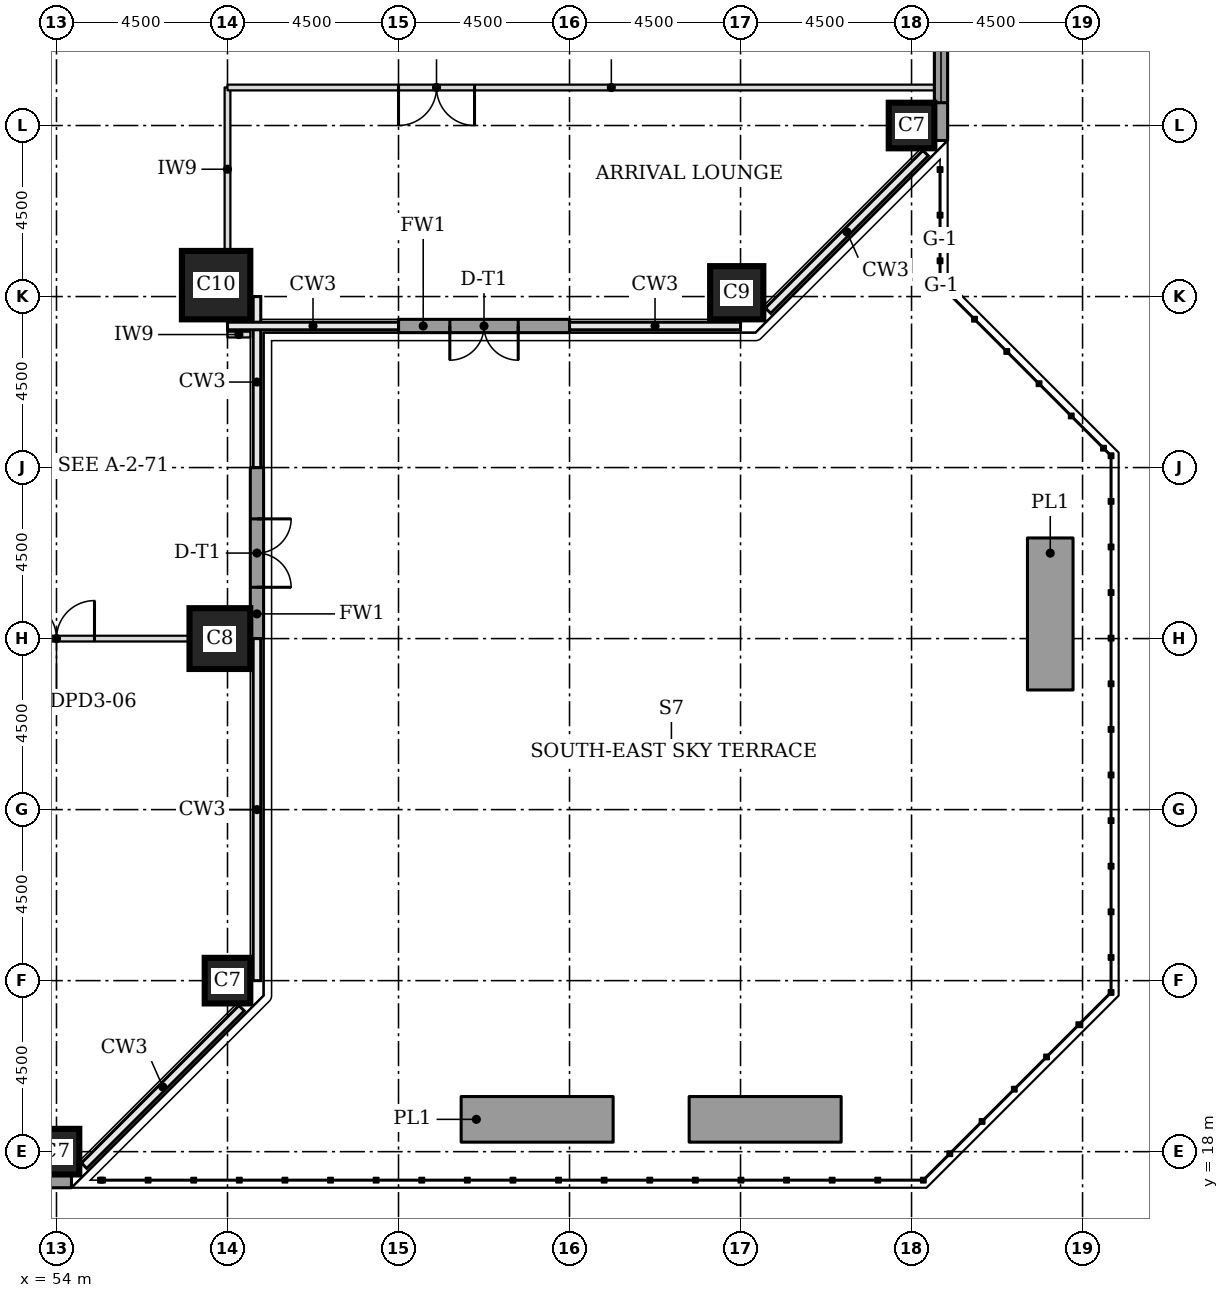
"""IFC4 building model, lengths in metres.
Left out: names, types, materials, properties, quantities, classifications, styles, units other than length and angle.
Written with IfcOpenShell. Run it as: python <this file> out.ifc"""

import sys

from ifc_helpers import new_model, si_unit, direction, frame, frame_2d, origin, origin_2d, place, context, subcontext, project, spatial, rectangle, extrude, element, fill, save


model = new_model("IFC4")
c1 = context("Model", 3, precision=1e-05, world=origin(), true_north=direction((0.0, 1.0)))
c2 = subcontext(c1, "Body", "Model", "MODEL_VIEW")
j1 = project(units=[si_unit("LENGTHUNIT", "METRE"), si_unit("PLANEANGLEUNIT", "RADIAN")], contexts=[c1])
p1 = place(None, origin())
s1 = spatial("IfcSite", under=j1, at=p1, CompositionType="ELEMENT")
p2 = place(p1, origin())
s2 = spatial("IfcBuilding", under=s1, at=p2, CompositionType="ELEMENT")
p3 = place(p2, frame((0.0, 0.0, 18.5)))
s3 = spatial("IfcBuildingStorey", under=s2, at=p3, CompositionType="ELEMENT", Elevation=18.5)
for number, where, z_axis, x_axis in (
    (1, (54.0, 18.0, 0.0), (0.0, 0.0, 1.0), (1.0, 0.0, 0.0)),
    (2, (58.5, 22.5, 0.0), (0.0, 0.0, 1.0), (1.0, 0.0, 0.0)),
):
    element("IfcColumn", number, at=place(p3, frame(where, z_axis=z_axis, x_axis=x_axis)), inside=s3, PredefinedType="COLUMN", context=c2, shape_type="SweptSolid", body=[
        extrude(rectangle(XDim=1.2, YDim=1.2, at=origin_2d()), origin(), (0.0, 0.0, 1.0), 4.6),
    ])
p4 = place(p3, frame((58.3, 31.5, 0.0), z_axis=(0.0, 0.0, 1.0), x_axis=(1.0, 0.0, 0.0)))
e3 = element("IfcColumn", 3, at=p4, inside=s3, PredefinedType="COLUMN", context=c2, shape_type="SweptSolid", body=[
    extrude(rectangle(XDim=1.6, YDim=1.6, at=origin_2d()), origin(), (0.0, 0.0, 1.0), 4.6),
])
p5 = place(p3, frame((58.2, 40.8, 0.0), z_axis=(0.0, 0.0, 1.0), x_axis=(1.0, 0.0, 0.0)))
e4 = element("IfcColumn", 4, at=p5, inside=s3, PredefinedType="COLUMN", context=c2, shape_type="SweptSolid", body=[
    extrude(rectangle(XDim=1.8, YDim=1.8, at=origin_2d()), origin(), (0.0, 0.0, 1.0), 4.6),
])
p6 = place(p3, frame((71.9, 40.6, 0.0), z_axis=(0.0, 0.0, 1.0), x_axis=(1.0, 0.0, 0.0)))
e5 = element("IfcColumn", 5, at=p6, inside=s3, PredefinedType="COLUMN", context=c2, shape_type="SweptSolid", body=[
    extrude(rectangle(XDim=1.4, YDim=1.4, at=origin_2d()), origin(), (0.0, 0.0, 1.0), 4.6),
])
p7 = place(p3, frame((76.5, 45.0, 0.0), z_axis=(0.0, 0.0, 1.0), x_axis=(1.0, 0.0, 0.0)))
e6 = element("IfcColumn", 6, at=p7, inside=s3, PredefinedType="COLUMN", context=c2, shape_type="SweptSolid", body=[
    extrude(rectangle(XDim=1.2, YDim=1.2, at=origin_2d()), origin(), (0.0, 0.0, 1.0), 4.6),
])
p8 = place(p3, frame((36.0, 17.225, 0.0), z_axis=(0.0, 0.0, 1.0), x_axis=(1.0, 0.0, 0.0)))
e7 = element("IfcWall", 7, at=p8, inside=s3, PredefinedType="STANDARD", context=c2, shape_type="SweptSolid", body=[
    extrude(rectangle(XDim=18.394, YDim=0.35, at=frame_2d((9.197, 0.0))), origin(), (0.0, 0.0, 1.0), 4.355),
])
p9 = place(p8, frame((0.6, 0.0, 0.9)))
e8 = element("IfcOpeningElement", 8, at=p9, cuts=e7, PredefinedType="OPENING", context=c2, shape_type="SweptSolid", body=[
    extrude(rectangle(XDim=3.3, YDim=2.7, at=frame_2d((1.65, 1.35))), frame((0.0, 0.185, 0.0), z_axis=(0.0, -1.0, 0.0), x_axis=(1.0, 0.0, 0.0)), (0.0, 0.0, 1.0), 0.37),
])
p10 = place(p8, frame((5.1, 0.0, 0.9)))
e9 = element("IfcOpeningElement", 9, at=p10, cuts=e7, PredefinedType="OPENING", context=c2, shape_type="SweptSolid", body=[
    extrude(rectangle(XDim=3.3, YDim=2.7, at=frame_2d((1.65, 1.35))), frame((0.0, 0.185, 0.0), z_axis=(0.0, -1.0, 0.0), x_axis=(1.0, 0.0, 0.0)), (0.0, 0.0, 1.0), 0.37),
])
p11 = place(p8, frame((9.6, 0.0, 0.9)))
e10 = element("IfcOpeningElement", 10, at=p11, cuts=e7, PredefinedType="OPENING", context=c2, shape_type="SweptSolid", body=[
    extrude(rectangle(XDim=3.3, YDim=2.7, at=frame_2d((1.65, 1.35))), frame((0.0, 0.185, 0.0), z_axis=(0.0, -1.0, 0.0), x_axis=(1.0, 0.0, 0.0)), (0.0, 0.0, 1.0), 0.37),
])
p12 = place(p8, frame((14.1, 0.0, 0.9)))
e11 = element("IfcOpeningElement", 11, at=p12, cuts=e7, PredefinedType="OPENING", context=c2, shape_type="SweptSolid", body=[
    extrude(rectangle(XDim=3.3, YDim=2.7, at=frame_2d((1.65, 1.35))), frame((0.0, 0.185, 0.0), z_axis=(0.0, -1.0, 0.0), x_axis=(1.0, 0.0, 0.0)), (0.0, 0.0, 1.0), 0.37),
])
p13 = place(p3, frame((59.275, 31.5, 0.0), z_axis=(0.0, 0.0, 1.0), x_axis=(0.0, 1.0, 0.0)))
e12 = element("IfcWall", 12, at=p13, inside=s3, PredefinedType="STANDARD", context=c2, shape_type="SweptSolid", body=[
    extrude(rectangle(XDim=4.5, YDim=0.35, at=frame_2d((2.25, 0.0))), origin(), (0.0, 0.0, 1.0), 4.355),
])
p14 = place(p13, frame((1.35, 0.0, 0.0)))
e13 = element("IfcOpeningElement", 13, at=p14, cuts=e12, PredefinedType="OPENING", context=c2, shape_type="SweptSolid", body=[
    extrude(rectangle(XDim=1.8, YDim=2.4, at=frame_2d((0.9, 1.2))), frame((0.0, 0.185, 0.0), z_axis=(0.0, -1.0, 0.0), x_axis=(1.0, 0.0, 0.0)), (0.0, 0.0, 1.0), 0.37),
])
p15 = place(p3, frame((63.0, 39.725, 0.0), z_axis=(0.0, 0.0, 1.0), x_axis=(1.0, 0.0, 0.0)))
e14 = element("IfcWall", 14, at=p15, inside=s3, PredefinedType="STANDARD", context=c2, shape_type="SweptSolid", body=[
    extrude(rectangle(XDim=4.5, YDim=0.35, at=frame_2d((2.25, 0.0))), origin(), (0.0, 0.0, 1.0), 4.355),
])
p16 = place(p15, frame((1.35, 0.0, 0.0)))
e15 = element("IfcOpeningElement", 15, at=p16, cuts=e14, PredefinedType="OPENING", context=c2, shape_type="SweptSolid", body=[
    extrude(rectangle(XDim=1.8, YDim=2.4, at=frame_2d((0.9, 1.2))), frame((0.0, 0.185, 0.0), z_axis=(0.0, -1.0, 0.0), x_axis=(1.0, 0.0, 0.0)), (0.0, 0.0, 1.0), 0.37),
])
p17 = place(p3, frame((77.275, 44.606, 0.0), z_axis=(0.0, 0.0, 1.0), x_axis=(0.0, 1.0, 0.0)))
e16 = element("IfcWall", 16, at=p17, inside=s3, PredefinedType="STANDARD", context=c2, shape_type="SweptSolid", body=[
    extrude(rectangle(XDim=32.287, YDim=0.35, at=frame_2d((16.144, 0.0))), origin(), (0.0, 0.0, 1.0), 4.355),
])
p18 = place(p17, frame((0.993, 0.0, 0.9)))
e17 = element("IfcOpeningElement", 17, at=p18, cuts=e16, PredefinedType="OPENING", context=c2, shape_type="SweptSolid", body=[
    extrude(rectangle(XDim=3.3, YDim=2.7, at=frame_2d((1.65, 1.35))), frame((0.0, 0.185, 0.0), z_axis=(0.0, -1.0, 0.0), x_axis=(1.0, 0.0, 0.0)), (0.0, 0.0, 1.0), 0.37),
])
p19 = place(p17, frame((5.493, 0.0, 0.9)))
e18 = element("IfcOpeningElement", 18, at=p19, cuts=e16, PredefinedType="OPENING", context=c2, shape_type="SweptSolid", body=[
    extrude(rectangle(XDim=3.3, YDim=2.7, at=frame_2d((1.65, 1.35))), frame((0.0, 0.185, 0.0), z_axis=(0.0, -1.0, 0.0), x_axis=(1.0, 0.0, 0.0)), (0.0, 0.0, 1.0), 0.37),
])
p20 = place(p17, frame((9.993, 0.0, 0.9)))
e19 = element("IfcOpeningElement", 19, at=p20, cuts=e16, PredefinedType="OPENING", context=c2, shape_type="SweptSolid", body=[
    extrude(rectangle(XDim=3.3, YDim=2.7, at=frame_2d((1.65, 1.35))), frame((0.0, 0.185, 0.0), z_axis=(0.0, -1.0, 0.0), x_axis=(1.0, 0.0, 0.0)), (0.0, 0.0, 1.0), 0.37),
])
p21 = place(p17, frame((14.493, 0.0, 0.9)))
e20 = element("IfcOpeningElement", 20, at=p21, cuts=e16, PredefinedType="OPENING", context=c2, shape_type="SweptSolid", body=[
    extrude(rectangle(XDim=3.3, YDim=2.7, at=frame_2d((1.65, 1.35))), frame((0.0, 0.185, 0.0), z_axis=(0.0, -1.0, 0.0), x_axis=(1.0, 0.0, 0.0)), (0.0, 0.0, 1.0), 0.37),
])
p22 = place(p17, frame((18.993, 0.0, 0.9)))
e21 = element("IfcOpeningElement", 21, at=p22, cuts=e16, PredefinedType="OPENING", context=c2, shape_type="SweptSolid", body=[
    extrude(rectangle(XDim=3.3, YDim=2.7, at=frame_2d((1.65, 1.35))), frame((0.0, 0.185, 0.0), z_axis=(0.0, -1.0, 0.0), x_axis=(1.0, 0.0, 0.0)), (0.0, 0.0, 1.0), 0.37),
])
p23 = place(p17, frame((23.493, 0.0, 0.9)))
e22 = element("IfcOpeningElement", 22, at=p23, cuts=e16, PredefinedType="OPENING", context=c2, shape_type="SweptSolid", body=[
    extrude(rectangle(XDim=3.3, YDim=2.7, at=frame_2d((1.65, 1.35))), frame((0.0, 0.185, 0.0), z_axis=(0.0, -1.0, 0.0), x_axis=(1.0, 0.0, 0.0)), (0.0, 0.0, 1.0), 0.37),
])
p24 = place(p17, frame((27.993, 0.0, 0.9)))
e23 = element("IfcOpeningElement", 23, at=p24, cuts=e16, PredefinedType="OPENING", context=c2, shape_type="SweptSolid", body=[
    extrude(rectangle(XDim=3.3, YDim=2.7, at=frame_2d((1.65, 1.35))), frame((0.0, 0.185, 0.0), z_axis=(0.0, -1.0, 0.0), x_axis=(1.0, 0.0, 0.0)), (0.0, 0.0, 1.0), 0.37),
])
for number, where, z_axis, x_axis in (
    (24, (80.15, 34.148, 0.0), (0.0, 0.0, 1.0), (0.0, -1.0, 0.0)),
    (25, (74.648, 18.85, 0.0), (0.0, 0.0, 1.0), (-1.0, 0.0, 0.0)),
    (26, (68.648, 18.85, 0.0), (0.0, 0.0, 1.0), (-1.0, 0.0, 0.0)),
):
    element("IfcWall", number, at=place(p3, frame(where, z_axis=z_axis, x_axis=x_axis)), inside=s3, PredefinedType="STANDARD", context=c2, shape_type="SweptSolid", body=[
        extrude(rectangle(XDim=4.0, YDim=1.2, at=frame_2d((2.0, 0.0))), origin(), (0.0, 0.0, 1.0), 0.6),
    ])
p25 = place(p3, frame((49.5, 31.5, 0.0), z_axis=(0.0, 0.0, 1.0), x_axis=(1.0, 0.0, 0.0)))
e27 = element("IfcWall", 27, at=p25, inside=s3, PredefinedType="PARTITIONING", context=c2, shape_type="SweptSolid", body=[
    extrude(rectangle(XDim=8.0, YDim=0.15, at=frame_2d((4.0, 0.0))), origin(), (0.0, 0.0, 1.0), 4.38),
])
p26 = place(p25, frame((0.2, 0.0, 0.0)))
e28 = element("IfcOpeningElement", 28, at=p26, cuts=e27, PredefinedType="OPENING", context=c2, shape_type="SweptSolid", body=[
    extrude(rectangle(XDim=2.0, YDim=2.1, at=frame_2d((1.0, 1.05))), frame((0.0, 0.085, 0.0), z_axis=(0.0, -1.0, 0.0), x_axis=(1.0, 0.0, 0.0)), (0.0, 0.0, 1.0), 0.17),
])
p27 = place(p25, frame((3.5, 0.0, 0.0)))
e29 = element("IfcOpeningElement", 29, at=p27, cuts=e27, PredefinedType="OPENING", context=c2, shape_type="SweptSolid", body=[
    extrude(rectangle(XDim=2.0, YDim=2.1, at=frame_2d((1.0, 1.05))), frame((0.0, 0.085, 0.0), z_axis=(0.0, -1.0, 0.0), x_axis=(1.0, 0.0, 0.0)), (0.0, 0.0, 1.0), 0.17),
])
p28 = place(p3, frame((58.5, 39.5, 0.0), z_axis=(0.0, 0.0, 1.0), x_axis=(1.0, 0.0, 0.0)))
e30 = element("IfcWall", 30, at=p28, inside=s3, PredefinedType="PARTITIONING", context=c2, shape_type="SweptSolid", body=[
    extrude(rectangle(XDim=0.6, YDim=0.15, at=frame_2d((0.3, 0.0))), origin(), (0.0, 0.0, 1.0), 4.38),
])
p29 = place(p3, frame((58.5, 41.7, 0.0), z_axis=(0.0, 0.0, 1.0), x_axis=(0.0, 1.0, 0.0)))
e31 = element("IfcWall", 31, at=p29, inside=s3, PredefinedType="PARTITIONING", context=c2, shape_type="SweptSolid", body=[
    extrude(rectangle(XDim=4.3, YDim=0.15, at=frame_2d((2.15, 0.0))), origin(), (0.0, 0.0, 1.0), 4.38),
])
p30 = place(p3, frame((58.5, 46.0, 0.0), z_axis=(0.0, 0.0, 1.0), x_axis=(1.0, 0.0, 0.0)))
e32 = element("IfcWall", 32, at=p30, inside=s3, PredefinedType="PARTITIONING", context=c2, shape_type="SweptSolid", body=[
    extrude(rectangle(XDim=18.6, YDim=0.15, at=frame_2d((9.3, 0.0))), origin(), (0.0, 0.0, 1.0), 4.38),
])
p31 = place(p30, frame((4.5, 0.0, 0.0)))
e33 = element("IfcOpeningElement", 33, at=p31, cuts=e32, PredefinedType="OPENING", context=c2, shape_type="SweptSolid", body=[
    extrude(rectangle(XDim=2.0, YDim=2.1, at=frame_2d((1.0, 1.05))), frame((0.0, 0.085, 0.0), z_axis=(0.0, -1.0, 0.0), x_axis=(1.0, 0.0, 0.0)), (0.0, 0.0, 1.0), 0.17),
])
p32 = place(p14, frame((1.8, 0.0, 0.0), z_axis=(0.0, 0.0, 1.0), x_axis=(-1.0, 0.0, 0.0)))
e34 = element("IfcDoor", 34, at=p32, inside=s3, OperationType="DOUBLE_DOOR_SINGLE_SWING", PredefinedType="DOOR", context=c2, shape_type="SweptSolid", body=[
    extrude(rectangle(XDim=1.8, YDim=2.4, at=frame_2d((0.9, 1.2))), frame((0.0, -0.03, 0.0), z_axis=(0.0, -1.0, 0.0), x_axis=(1.0, 0.0, 0.0)), (0.0, 0.0, 1.0), 0.05),
])
fill(e13, e34)
p33 = place(p16, frame((1.8, 0.0, 0.0), z_axis=(0.0, 0.0, 1.0), x_axis=(-1.0, 0.0, 0.0)))
e35 = element("IfcDoor", 35, at=p33, inside=s3, OperationType="DOUBLE_DOOR_SINGLE_SWING", PredefinedType="DOOR", context=c2, shape_type="SweptSolid", body=[
    extrude(rectangle(XDim=1.8, YDim=2.4, at=frame_2d((0.9, 1.2))), frame((0.0, -0.03, 0.0), z_axis=(0.0, -1.0, 0.0), x_axis=(1.0, 0.0, 0.0)), (0.0, 0.0, 1.0), 0.05),
])
fill(e15, e35)
p34 = place(p18, origin())
e36 = element("IfcWindow", 36, at=p34, inside=s3, PartitioningType="SINGLE_PANEL", PredefinedType="WINDOW", context=c2, shape_type="SweptSolid", body=[
    extrude(rectangle(XDim=3.3, YDim=2.7, at=frame_2d((1.65, 1.35))), frame((0.0, 0.085, 0.0), z_axis=(0.0, -1.0, 0.0), x_axis=(1.0, 0.0, 0.0)), (0.0, 0.0, 1.0), 0.06),
])
fill(e17, e36)
p35 = place(p27, origin())
e37 = element("IfcDoor", 37, at=p35, inside=s3, OperationType="DOUBLE_DOOR_SINGLE_SWING", PredefinedType="DOOR", context=c2, shape_type="SweptSolid", body=[
    extrude(rectangle(XDim=2.0, YDim=2.1, at=frame_2d((1.0, 1.05))), frame((0.0, 0.025, 0.0), z_axis=(0.0, -1.0, 0.0), x_axis=(1.0, 0.0, 0.0)), (0.0, 0.0, 1.0), 0.05),
])
fill(e29, e37)
p36 = place(p31, frame((2.0, 0.0, 0.0), z_axis=(0.0, 0.0, 1.0), x_axis=(-1.0, 0.0, 0.0)))
e38 = element("IfcDoor", 38, at=p36, inside=s3, OperationType="DOUBLE_DOOR_SINGLE_SWING", PredefinedType="DOOR", context=c2, shape_type="SweptSolid", body=[
    extrude(rectangle(XDim=2.0, YDim=2.1, at=frame_2d((1.0, 1.05))), frame((0.0, 0.025, 0.0), z_axis=(0.0, -1.0, 0.0), x_axis=(1.0, 0.0, 0.0)), (0.0, 0.0, 1.0), 0.05),
])
fill(e33, e38)
save(model, sys.argv[1])
